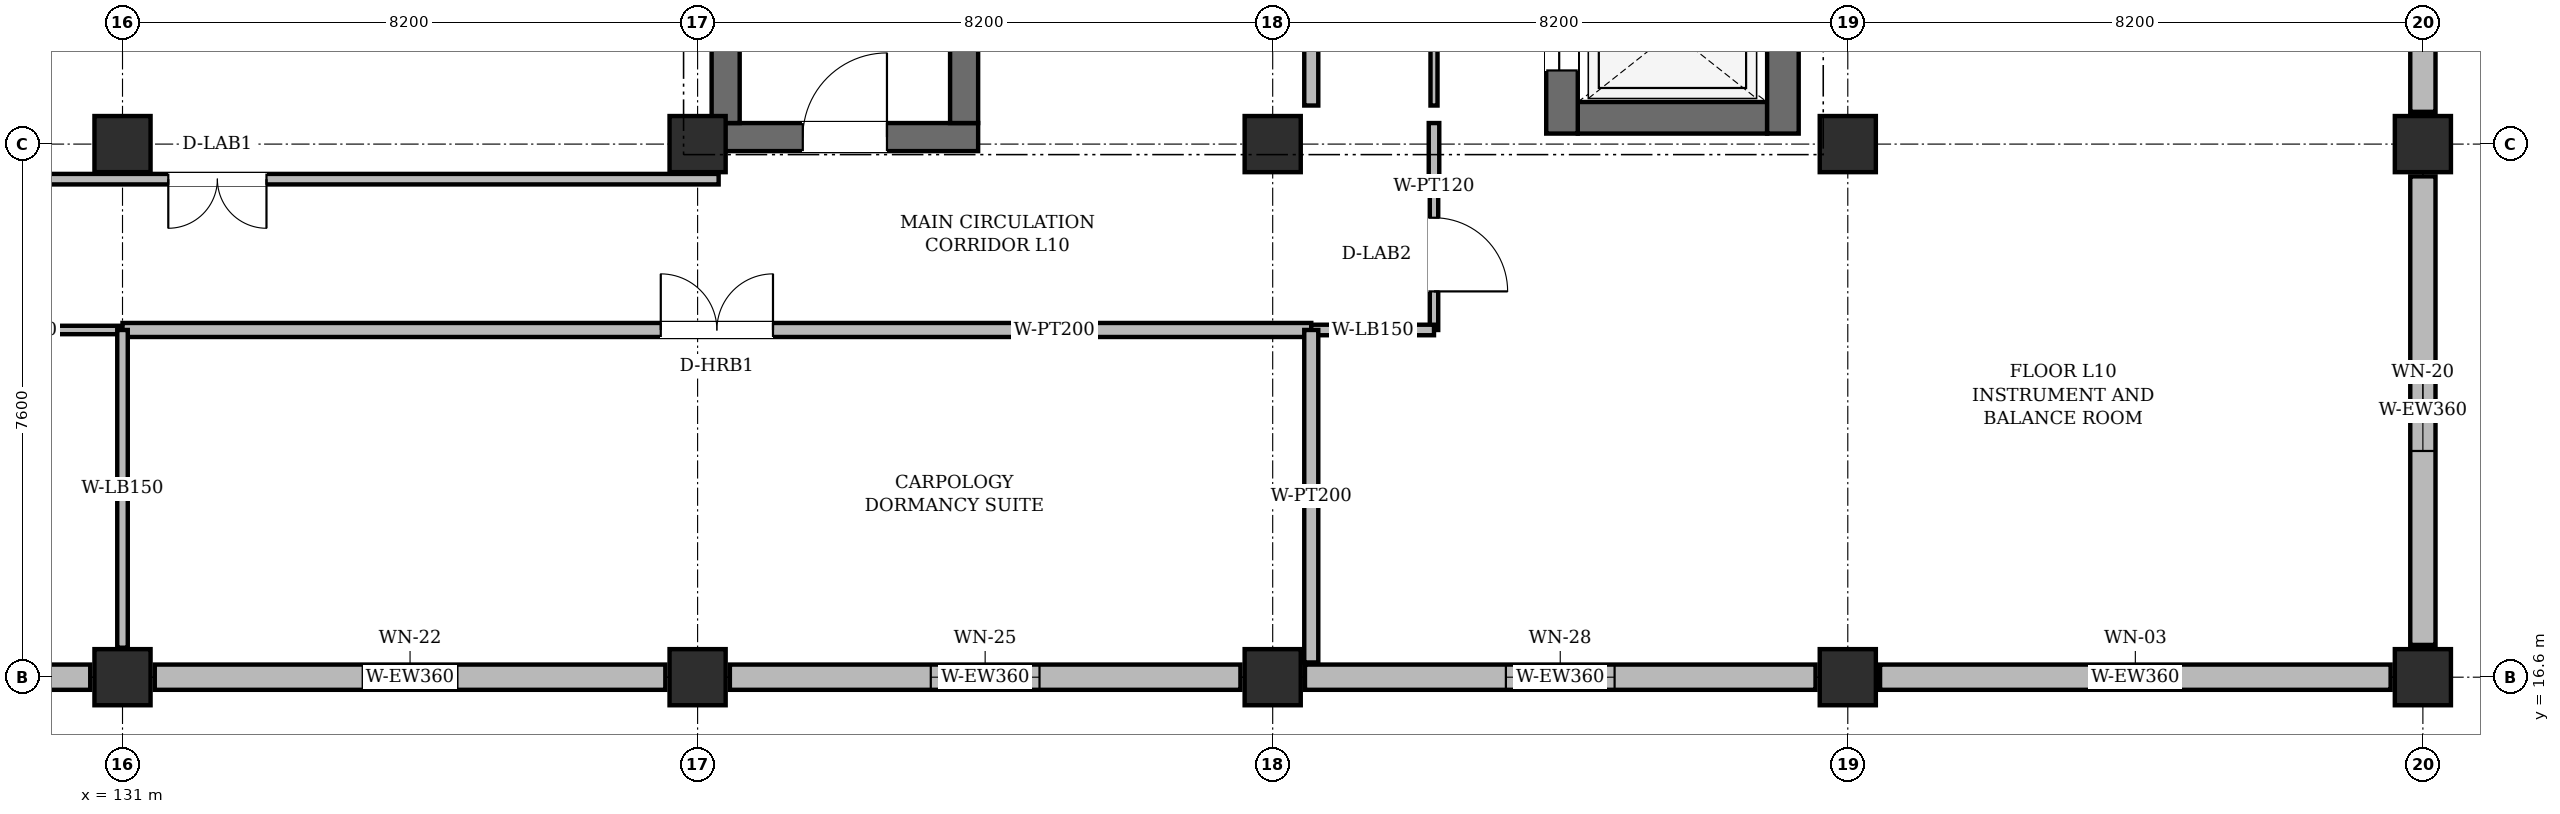
"""IFC4 building model, lengths in metres.
Left out: names, types, materials, properties, quantities, classifications, styles, units other than length and angle.
Written with IfcOpenShell. Run it as: python <this file> out.ifc"""

import sys

from ifc_helpers import new_model, si_unit, direction, frame, frame_2d, origin, origin_2d, place, context, subcontext, project, spatial, rectangle, extrude, element, fill, save


model = new_model("IFC4")
c1 = context("Model", 3, precision=1e-05, world=origin(), true_north=direction((0.0, 1.0)))
c2 = subcontext(c1, "Body", "Model", "MODEL_VIEW")
j1 = project(units=[si_unit("LENGTHUNIT", "METRE"), si_unit("PLANEANGLEUNIT", "RADIAN")], contexts=[c1])
p1 = place(None, origin())
s1 = spatial("IfcSite", under=j1, at=p1, CompositionType="ELEMENT")
p2 = place(p1, origin())
s2 = spatial("IfcBuilding", under=s1, at=p2, CompositionType="ELEMENT")
p3 = place(p2, frame((0.0, 0.0, 45.0)))
s3 = spatial("IfcBuildingStorey", under=s2, at=p3, CompositionType="ELEMENT", Elevation=45.0)
for number, where, z_axis, x_axis in (
    (1, (131.0, 16.6, 0.0), (0.0, 0.0, 1.0), (1.0, 0.0, 0.0)),
    (2, (131.0, 24.2, 0.0), (0.0, 0.0, 1.0), (1.0, 0.0, 0.0)),
    (3, (139.2, 16.6, 0.0), (0.0, 0.0, 1.0), (1.0, 0.0, 0.0)),
    (4, (139.2, 24.2, 0.0), (0.0, 0.0, 1.0), (1.0, 0.0, 0.0)),
    (5, (147.4, 16.6, 0.0), (0.0, 0.0, 1.0), (1.0, 0.0, 0.0)),
    (6, (147.4, 24.2, 0.0), (0.0, 0.0, 1.0), (1.0, 0.0, 0.0)),
    (7, (155.6, 16.6, 0.0), (0.0, 0.0, 1.0), (1.0, 0.0, 0.0)),
    (8, (155.6, 24.2, 0.0), (0.0, 0.0, 1.0), (1.0, 0.0, 0.0)),
    (9, (163.8, 16.6, 0.0), (0.0, 0.0, 1.0), (1.0, 0.0, 0.0)),
    (10, (163.8, 24.2, 0.0), (0.0, 0.0, 1.0), (1.0, 0.0, 0.0)),
):
    element("IfcColumn", number, at=place(p3, frame(where, z_axis=z_axis, x_axis=x_axis)), inside=s3, PredefinedType="COLUMN", context=c2, shape_type="SweptSolid", body=[
        extrude(rectangle(XDim=0.8, YDim=0.8, at=origin_2d()), origin(), (0.0, 0.0, 1.0), 3.95),
    ])
p4 = place(p3, frame((123.26, 16.6, 0.0), z_axis=(0.0, 0.0, 1.0), x_axis=(1.0, 0.0, 0.0)))
e11 = element("IfcWall", 11, at=p4, inside=s3, PredefinedType="SOLIDWALL", context=c2, shape_type="SweptSolid", body=[
    extrude(rectangle(XDim=7.28, YDim=0.36, at=frame_2d((3.64, 0.0))), origin(), (0.0, 0.0, 1.0), 3.335),
])
p5 = place(p4, frame((3.065, 0.0, 0.95)))
e12 = element("IfcOpeningElement", 12, at=p5, cuts=e11, PredefinedType="OPENING", context=c2, shape_type="SweptSolid", body=[
    extrude(rectangle(XDim=1.15, YDim=1.75, at=frame_2d((0.575, 0.875))), frame((0.0, 0.192, 0.0), z_axis=(0.0, -1.0, 0.0), x_axis=(1.0, 0.0, 0.0)), (0.0, 0.0, 1.0), 0.384),
])
p6 = place(p3, frame((131.46, 16.6, 0.0), z_axis=(0.0, 0.0, 1.0), x_axis=(1.0, 0.0, 0.0)))
e13 = element("IfcWall", 13, at=p6, inside=s3, PredefinedType="SOLIDWALL", context=c2, shape_type="SweptSolid", body=[
    extrude(rectangle(XDim=7.28, YDim=0.36, at=frame_2d((3.64, 0.0))), origin(), (0.0, 0.0, 1.0), 3.335),
])
p7 = place(p6, frame((2.965, 0.0, 0.95)))
e14 = element("IfcOpeningElement", 14, at=p7, cuts=e13, PredefinedType="OPENING", context=c2, shape_type="SweptSolid", body=[
    extrude(rectangle(XDim=1.35, YDim=1.5, at=frame_2d((0.675, 0.75))), frame((0.0, 0.192, 0.0), z_axis=(0.0, -1.0, 0.0), x_axis=(1.0, 0.0, 0.0)), (0.0, 0.0, 1.0), 0.384),
])
p8 = place(p3, frame((139.66, 16.6, 0.0), z_axis=(0.0, 0.0, 1.0), x_axis=(1.0, 0.0, 0.0)))
e15 = element("IfcWall", 15, at=p8, inside=s3, PredefinedType="SOLIDWALL", context=c2, shape_type="SweptSolid", body=[
    extrude(rectangle(XDim=7.28, YDim=0.36, at=frame_2d((3.64, 0.0))), origin(), (0.0, 0.0, 1.0), 3.335),
])
p9 = place(p8, frame((2.865, 0.0, 0.95)))
e16 = element("IfcOpeningElement", 16, at=p9, cuts=e15, PredefinedType="OPENING", context=c2, shape_type="SweptSolid", body=[
    extrude(rectangle(XDim=1.55, YDim=1.25, at=frame_2d((0.775, 0.625))), frame((0.0, 0.192, 0.0), z_axis=(0.0, -1.0, 0.0), x_axis=(1.0, 0.0, 0.0)), (0.0, 0.0, 1.0), 0.384),
])
p10 = place(p3, frame((147.86, 16.6, 0.0), z_axis=(0.0, 0.0, 1.0), x_axis=(1.0, 0.0, 0.0)))
e17 = element("IfcWall", 17, at=p10, inside=s3, PredefinedType="SOLIDWALL", context=c2, shape_type="SweptSolid", body=[
    extrude(rectangle(XDim=7.28, YDim=0.36, at=frame_2d((3.64, 0.0))), origin(), (0.0, 0.0, 1.0), 3.335),
])
p11 = place(p10, frame((2.865, 0.0, 0.95)))
e18 = element("IfcOpeningElement", 18, at=p11, cuts=e17, PredefinedType="OPENING", context=c2, shape_type="SweptSolid", body=[
    extrude(rectangle(XDim=1.55, YDim=2.05, at=frame_2d((0.775, 1.025))), frame((0.0, 0.192, 0.0), z_axis=(0.0, -1.0, 0.0), x_axis=(1.0, 0.0, 0.0)), (0.0, 0.0, 1.0), 0.384),
])
p12 = place(p3, frame((156.06, 16.6, 0.0), z_axis=(0.0, 0.0, 1.0), x_axis=(1.0, 0.0, 0.0)))
e19 = element("IfcWall", 19, at=p12, inside=s3, PredefinedType="SOLIDWALL", context=c2, shape_type="SweptSolid", body=[
    extrude(rectangle(XDim=7.28, YDim=0.36, at=frame_2d((3.64, 0.0))), origin(), (0.0, 0.0, 1.0), 3.335),
])
p13 = place(p12, frame((3.265, 0.0, 0.95)))
e20 = element("IfcOpeningElement", 20, at=p13, cuts=e19, PredefinedType="OPENING", context=c2, shape_type="SweptSolid", body=[
    extrude(rectangle(XDim=0.75, YDim=1.8, at=frame_2d((0.375, 0.9))), frame((0.0, 0.192, 0.0), z_axis=(0.0, -1.0, 0.0), x_axis=(1.0, 0.0, 0.0)), (0.0, 0.0, 1.0), 0.384),
])
p14 = place(p3, frame((163.8, 17.06, 0.0), z_axis=(0.0, 0.0, 1.0), x_axis=(0.0, 1.0, 0.0)))
e21 = element("IfcWall", 21, at=p14, inside=s3, PredefinedType="SOLIDWALL", context=c2, shape_type="SweptSolid", body=[
    extrude(rectangle(XDim=6.68, YDim=0.36, at=frame_2d((3.34, 0.0))), origin(), (0.0, 0.0, 1.0), 3.335),
])
p15 = place(p14, frame((2.765, 0.0, 0.95)))
e22 = element("IfcOpeningElement", 22, at=p15, cuts=e21, PredefinedType="OPENING", context=c2, shape_type="SweptSolid", body=[
    extrude(rectangle(XDim=1.15, YDim=2.05, at=frame_2d((0.575, 1.025))), frame((0.0, 0.192, 0.0), z_axis=(0.0, -1.0, 0.0), x_axis=(1.0, 0.0, 0.0)), (0.0, 0.0, 1.0), 0.384),
])
p16 = place(p3, frame((163.8, 24.66, 0.0), z_axis=(0.0, 0.0, 1.0), x_axis=(0.0, 1.0, 0.0)))
e23 = element("IfcWall", 23, at=p16, inside=s3, PredefinedType="SOLIDWALL", context=c2, shape_type="SweptSolid", body=[
    extrude(rectangle(XDim=6.68, YDim=0.36, at=frame_2d((3.34, 0.0))), origin(), (0.0, 0.0, 1.0), 3.335),
])
p17 = place(p16, frame((2.665, 0.0, 0.95)))
e24 = element("IfcOpeningElement", 24, at=p17, cuts=e23, PredefinedType="OPENING", context=c2, shape_type="SweptSolid", body=[
    extrude(rectangle(XDim=1.35, YDim=1.75, at=frame_2d((0.675, 0.875))), frame((0.0, 0.192, 0.0), z_axis=(0.0, -1.0, 0.0), x_axis=(1.0, 0.0, 0.0)), (0.0, 0.0, 1.0), 0.384),
])
p18 = place(p3, frame((139.4, 24.3, 0.0), z_axis=(0.0, 0.0, 1.0), x_axis=(1.0, 0.0, 0.0)))
e25 = element("IfcWall", 25, at=p18, inside=s3, PredefinedType="SHEAR", context=c2, shape_type="SweptSolid", body=[
    extrude(rectangle(XDim=3.8, YDim=0.4, at=frame_2d((1.9, 0.0))), origin(), (0.0, 0.0, 1.0), 3.95),
])
p19 = place(p18, frame((1.3, 0.0, 0.0)))
e26 = element("IfcOpeningElement", 26, at=p19, cuts=e25, PredefinedType="OPENING", context=c2, shape_type="SweptSolid", body=[
    extrude(rectangle(XDim=1.2, YDim=2.2, at=frame_2d((0.6, 1.1))), frame((0.0, 0.212, 0.0), z_axis=(0.0, -1.0, 0.0), x_axis=(1.0, 0.0, 0.0)), (0.0, 0.0, 1.0), 0.424),
])
for number, where, z_axis, x_axis in (
    (27, (139.6, 24.5, 0.0), (0.0, 0.0, 1.0), (0.0, 1.0, 0.0)),
    (28, (143.0, 24.5, 0.0), (0.0, 0.0, 1.0), (0.0, 1.0, 0.0)),
):
    element("IfcWall", number, at=place(p3, frame(where, z_axis=z_axis, x_axis=x_axis)), inside=s3, PredefinedType="SHEAR", context=c2, shape_type="SweptSolid", body=[
        extrude(rectangle(XDim=7.0, YDim=0.4, at=frame_2d((3.5, 0.0))), origin(), (0.0, 0.0, 1.0), 3.95),
    ])
p20 = place(p3, frame((151.75, 24.575, 0.0), z_axis=(0.0, 0.0, 1.0), x_axis=(1.0, 0.0, 0.0)))
e29 = element("IfcWall", 29, at=p20, inside=s3, PredefinedType="SHEAR", context=c2, shape_type="SweptSolid", body=[
    extrude(rectangle(XDim=2.7, YDim=0.45, at=frame_2d((1.35, 0.0))), origin(), (0.0, 0.0, 1.0), 3.95),
])
p21 = place(p3, frame((151.525, 24.35, 0.0), z_axis=(0.0, 0.0, 1.0), x_axis=(0.0, 1.0, 0.0)))
e30 = element("IfcWall", 30, at=p21, inside=s3, PredefinedType="SHEAR", context=c2, shape_type="SweptSolid", body=[
    extrude(rectangle(XDim=2.9, YDim=0.45, at=frame_2d((1.45, 0.0))), origin(), (0.0, 0.0, 1.0), 3.95),
])
p22 = place(p21, frame((0.9, 0.0, 0.0)))
e31 = element("IfcOpeningElement", 31, at=p22, cuts=e30, PredefinedType="OPENING", context=c2, shape_type="SweptSolid", body=[
    extrude(rectangle(XDim=1.1, YDim=2.2, at=frame_2d((0.55, 1.1))), frame((0.0, 0.237, 0.0), z_axis=(0.0, -1.0, 0.0), x_axis=(1.0, 0.0, 0.0)), (0.0, 0.0, 1.0), 0.474),
])
p23 = place(p3, frame((154.675, 24.35, 0.0), z_axis=(0.0, 0.0, 1.0), x_axis=(0.0, 1.0, 0.0)))
e32 = element("IfcWall", 32, at=p23, inside=s3, PredefinedType="SHEAR", context=c2, shape_type="SweptSolid", body=[
    extrude(rectangle(XDim=2.9, YDim=0.45, at=frame_2d((1.45, 0.0))), origin(), (0.0, 0.0, 1.0), 3.95),
])
p24 = place(p3, frame((147.95, 31.75, 0.0), z_axis=(0.0, 0.0, 1.0), x_axis=(0.0, -1.0, 0.0)))
e33 = element("IfcWall", 33, at=p24, inside=s3, PredefinedType="PARTITIONING", context=c2, shape_type="SweptSolid", body=[
    extrude(rectangle(XDim=7.0, YDim=0.2, at=frame_2d((3.5, 0.0))), origin(), (0.0, 0.0, 1.0), 3.805),
])
p25 = place(p24, frame((2.75, 0.0, 0.0)))
e34 = element("IfcOpeningElement", 34, at=p25, cuts=e33, PredefinedType="OPENING", context=c2, shape_type="SweptSolid", body=[
    extrude(rectangle(XDim=1.5, YDim=2.2, at=frame_2d((0.75, 1.1))), frame((0.0, 0.112, 0.0), z_axis=(0.0, -1.0, 0.0), x_axis=(1.0, 0.0, 0.0)), (0.0, 0.0, 1.0), 0.224),
])
p26 = place(p3, frame((149.7, 24.75, 0.0), z_axis=(0.0, 0.0, 1.0), x_axis=(0.0, 1.0, 0.0)))
e35 = element("IfcWall", 35, at=p26, inside=s3, PredefinedType="PARTITIONING", context=c2, shape_type="SweptSolid", body=[
    extrude(rectangle(XDim=11.3, YDim=0.1, at=frame_2d((5.65, 0.0))), origin(), (0.0, 0.0, 1.0), 3.805),
])
p27 = place(p26, frame((4.75, 0.0, 0.0)))
e36 = element("IfcOpeningElement", 36, at=p27, cuts=e35, PredefinedType="OPENING", context=c2, shape_type="SweptSolid", body=[
    extrude(rectangle(XDim=1.8, YDim=2.4, at=frame_2d((0.9, 1.2))), frame((0.0, 0.062, 0.0), z_axis=(0.0, -1.0, 0.0), x_axis=(1.0, 0.0, 0.0)), (0.0, 0.0, 1.0), 0.124),
])
p28 = place(p3, frame((131.0, 21.55, 0.0), z_axis=(0.0, 0.0, 1.0), x_axis=(-1.0, 0.0, 0.0)))
e37 = element("IfcWall", 37, at=p28, inside=s3, PredefinedType="PARTITIONING", context=c2, shape_type="SweptSolid", body=[
    extrude(rectangle(XDim=7.8, YDim=0.12, at=frame_2d((3.9, 0.0))), origin(), (0.0, 0.0, 1.0), 3.625),
])
p29 = place(p28, frame((3.375, 0.0, 0.0)))
e38 = element("IfcOpeningElement", 38, at=p29, cuts=e37, PredefinedType="OPENING", context=c2, shape_type="SweptSolid", body=[
    extrude(rectangle(XDim=1.05, YDim=2.2, at=frame_2d((0.525, 1.1))), frame((0.0, 0.072, 0.0), z_axis=(0.0, -1.0, 0.0), x_axis=(1.0, 0.0, 0.0)), (0.0, 0.0, 1.0), 0.144),
])
p30 = place(p3, frame((147.95, 21.55, 0.0), z_axis=(0.0, 0.0, 1.0), x_axis=(-1.0, 0.0, 0.0)))
e39 = element("IfcWall", 39, at=p30, inside=s3, PredefinedType="PARTITIONING", context=c2, shape_type="SweptSolid", body=[
    extrude(rectangle(XDim=16.95, YDim=0.2, at=frame_2d((8.475, 0.0))), origin(), (0.0, 0.0, 1.0), 3.525),
])
p31 = place(p30, frame((7.675, 0.0, 0.0)))
e40 = element("IfcOpeningElement", 40, at=p31, cuts=e39, PredefinedType="OPENING", context=c2, shape_type="SweptSolid", body=[
    extrude(rectangle(XDim=1.6, YDim=2.3, at=frame_2d((0.8, 1.15))), frame((0.0, 0.112, 0.0), z_axis=(0.0, -1.0, 0.0), x_axis=(1.0, 0.0, 0.0)), (0.0, 0.0, 1.0), 0.224),
])
p32 = place(p3, frame((149.7, 24.5, 0.0), z_axis=(0.0, 0.0, 1.0), x_axis=(0.0, -1.0, 0.0)))
e41 = element("IfcWall", 41, at=p32, inside=s3, PredefinedType="PARTITIONING", context=c2, shape_type="SweptSolid", body=[
    extrude(rectangle(XDim=0.8, YDim=0.15, at=frame_2d((0.4, 0.0))), origin(), (0.0, 0.0, 1.0), 3.805),
])
p33 = place(p3, frame((149.7, 23.7, 0.0), z_axis=(0.0, 0.0, 1.0), x_axis=(0.0, -1.0, 0.0)))
e42 = element("IfcWall", 42, at=p33, inside=s3, PredefinedType="PARTITIONING", context=c2, shape_type="SweptSolid", body=[
    extrude(rectangle(XDim=2.15, YDim=0.12, at=frame_2d((1.075, 0.0))), origin(), (0.0, 0.0, 1.0), 3.805),
])
p34 = place(p33, frame((0.55, 0.0, 0.0)))
e43 = element("IfcOpeningElement", 43, at=p34, cuts=e42, PredefinedType="OPENING", context=c2, shape_type="SweptSolid", body=[
    extrude(rectangle(XDim=1.05, YDim=2.2, at=frame_2d((0.525, 1.1))), frame((0.0, 0.072, 0.0), z_axis=(0.0, -1.0, 0.0), x_axis=(1.0, 0.0, 0.0)), (0.0, 0.0, 1.0), 0.144),
])
p35 = place(p3, frame((149.7, 21.55, 0.0), z_axis=(0.0, 0.0, 1.0), x_axis=(-1.0, 0.0, 0.0)))
e44 = element("IfcWall", 44, at=p35, inside=s3, PredefinedType="PARTITIONING", context=c2, shape_type="SweptSolid", body=[
    extrude(rectangle(XDim=1.75, YDim=0.15, at=frame_2d((0.875, 0.0))), origin(), (0.0, 0.0, 1.0), 3.525),
])
p36 = place(p3, frame((123.2, 23.7, 0.0), z_axis=(0.0, 0.0, 1.0), x_axis=(1.0, 0.0, 0.0)))
e45 = element("IfcWall", 45, at=p36, inside=s3, PredefinedType="PARTITIONING", context=c2, shape_type="SweptSolid", body=[
    extrude(rectangle(XDim=16.3, YDim=0.15, at=frame_2d((8.15, 0.0))), origin(), (0.0, 0.0, 1.0), 3.805),
])
p37 = place(p36, frame((8.453, 0.0, 0.0)))
e46 = element("IfcOpeningElement", 46, at=p37, cuts=e45, PredefinedType="OPENING", context=c2, shape_type="SweptSolid", body=[
    extrude(rectangle(XDim=1.4, YDim=2.2, at=frame_2d((0.7, 1.1))), frame((0.0, 0.087, 0.0), z_axis=(0.0, -1.0, 0.0), x_axis=(1.0, 0.0, 0.0)), (0.0, 0.0, 1.0), 0.174),
])
p38 = place(p3, frame((131.0, 21.55, 0.0), z_axis=(0.0, 0.0, 1.0), x_axis=(0.0, -1.0, 0.0)))
e47 = element("IfcWall", 47, at=p38, inside=s3, PredefinedType="PARTITIONING", context=c2, shape_type="SweptSolid", body=[
    extrude(rectangle(XDim=4.53, YDim=0.15, at=frame_2d((2.265, 0.0))), origin(), (0.0, 0.0, 1.0), 3.285),
])
p39 = place(p3, frame((147.95, 21.55, 0.0), z_axis=(0.0, 0.0, 1.0), x_axis=(0.0, -1.0, 0.0)))
e48 = element("IfcWall", 48, at=p39, inside=s3, PredefinedType="PARTITIONING", context=c2, shape_type="SweptSolid", body=[
    extrude(rectangle(XDim=4.74, YDim=0.2, at=frame_2d((2.37, 0.0))), origin(), (0.0, 0.0, 1.0), 3.805),
])
p40 = place(p7, origin())
e49 = element("IfcWindow", 49, at=p40, inside=s3, PartitioningType="SINGLE_PANEL", PredefinedType="WINDOW", context=c2, shape_type="SweptSolid", body=[
    extrude(rectangle(XDim=1.35, YDim=1.5, at=frame_2d((0.675, 0.75))), frame((0.0, 0.03, 0.0), z_axis=(0.0, -1.0, 0.0), x_axis=(1.0, 0.0, 0.0)), (0.0, 0.0, 1.0), 0.06),
])
fill(e14, e49)
p41 = place(p9, origin())
e50 = element("IfcWindow", 50, at=p41, inside=s3, PartitioningType="DOUBLE_PANEL_VERTICAL", PredefinedType="WINDOW", context=c2, shape_type="SweptSolid", body=[
    extrude(rectangle(XDim=1.55, YDim=1.25, at=frame_2d((0.775, 0.625))), frame((0.0, 0.03, 0.0), z_axis=(0.0, -1.0, 0.0), x_axis=(1.0, 0.0, 0.0)), (0.0, 0.0, 1.0), 0.06),
])
fill(e16, e50)
p42 = place(p11, origin())
e51 = element("IfcWindow", 51, at=p42, inside=s3, PartitioningType="DOUBLE_PANEL_VERTICAL", PredefinedType="WINDOW", context=c2, shape_type="SweptSolid", body=[
    extrude(rectangle(XDim=1.55, YDim=2.05, at=frame_2d((0.775, 1.025))), frame((0.0, 0.03, 0.0), z_axis=(0.0, -1.0, 0.0), x_axis=(1.0, 0.0, 0.0)), (0.0, 0.0, 1.0), 0.06),
])
fill(e18, e51)
p43 = place(p13, origin())
e52 = element("IfcWindow", 52, at=p43, inside=s3, PartitioningType="SINGLE_PANEL", PredefinedType="WINDOW", context=c2, shape_type="SweptSolid", body=[
    extrude(rectangle(XDim=0.75, YDim=1.8, at=frame_2d((0.375, 0.9))), frame((0.0, 0.03, 0.0), z_axis=(0.0, -1.0, 0.0), x_axis=(1.0, 0.0, 0.0)), (0.0, 0.0, 1.0), 0.06),
])
fill(e20, e52)
p44 = place(p15, origin())
e53 = element("IfcWindow", 53, at=p44, inside=s3, PartitioningType="SINGLE_PANEL", PredefinedType="WINDOW", context=c2, shape_type="SweptSolid", body=[
    extrude(rectangle(XDim=1.15, YDim=2.05, at=frame_2d((0.575, 1.025))), frame((0.0, 0.03, 0.0), z_axis=(0.0, -1.0, 0.0), x_axis=(1.0, 0.0, 0.0)), (0.0, 0.0, 1.0), 0.06),
])
fill(e22, e53)
p45 = place(p19, origin())
e54 = element("IfcDoor", 54, at=p45, inside=s3, OperationType="SINGLE_SWING_RIGHT", PredefinedType="DOOR", context=c2, shape_type="SweptSolid", body=[
    extrude(rectangle(XDim=1.2, YDim=2.2, at=frame_2d((0.6, 1.1))), frame((0.0, 0.025, 0.0), z_axis=(0.0, -1.0, 0.0), x_axis=(1.0, 0.0, 0.0)), (0.0, 0.0, 1.0), 0.05),
])
fill(e26, e54)
p46 = place(p22, origin())
e55 = element("IfcDoor", 55, at=p46, inside=s3, OperationType="DOUBLE_DOOR_SLIDING", PredefinedType="DOOR", context=c2, shape_type="SweptSolid", body=[
    extrude(rectangle(XDim=1.1, YDim=2.2, at=frame_2d((0.55, 1.1))), frame((0.0, 0.025, 0.0), z_axis=(0.0, -1.0, 0.0), x_axis=(1.0, 0.0, 0.0)), (0.0, 0.0, 1.0), 0.05),
])
fill(e31, e55)
p47 = place(p31, frame((1.6, 0.0, 0.0), z_axis=(0.0, 0.0, 1.0), x_axis=(-1.0, 0.0, 0.0)))
e56 = element("IfcDoor", 56, at=p47, inside=s3, OperationType="DOUBLE_DOOR_SINGLE_SWING", PredefinedType="DOOR", context=c2, shape_type="SweptSolid", body=[
    extrude(rectangle(XDim=1.6, YDim=2.3, at=frame_2d((0.8, 1.15))), frame((0.0, 0.025, 0.0), z_axis=(0.0, -1.0, 0.0), x_axis=(1.0, 0.0, 0.0)), (0.0, 0.0, 1.0), 0.05),
])
fill(e40, e56)
p48 = place(p34, origin())
e57 = element("IfcDoor", 57, at=p48, inside=s3, OperationType="SINGLE_SWING_RIGHT", PredefinedType="DOOR", context=c2, shape_type="SweptSolid", body=[
    extrude(rectangle(XDim=1.05, YDim=2.2, at=frame_2d((0.525, 1.1))), frame((0.0, 0.025, 0.0), z_axis=(0.0, -1.0, 0.0), x_axis=(1.0, 0.0, 0.0)), (0.0, 0.0, 1.0), 0.05),
])
fill(e43, e57)
p49 = place(p37, frame((1.4, 0.0, 0.0), z_axis=(0.0, 0.0, 1.0), x_axis=(-1.0, 0.0, 0.0)))
e58 = element("IfcDoor", 58, at=p49, inside=s3, OperationType="DOUBLE_DOOR_SINGLE_SWING", PredefinedType="DOOR", context=c2, shape_type="SweptSolid", body=[
    extrude(rectangle(XDim=1.4, YDim=2.2, at=frame_2d((0.7, 1.1))), frame((0.0, 0.025, 0.0), z_axis=(0.0, -1.0, 0.0), x_axis=(1.0, 0.0, 0.0)), (0.0, 0.0, 1.0), 0.05),
])
fill(e46, e58)
save(model, sys.argv[1])
